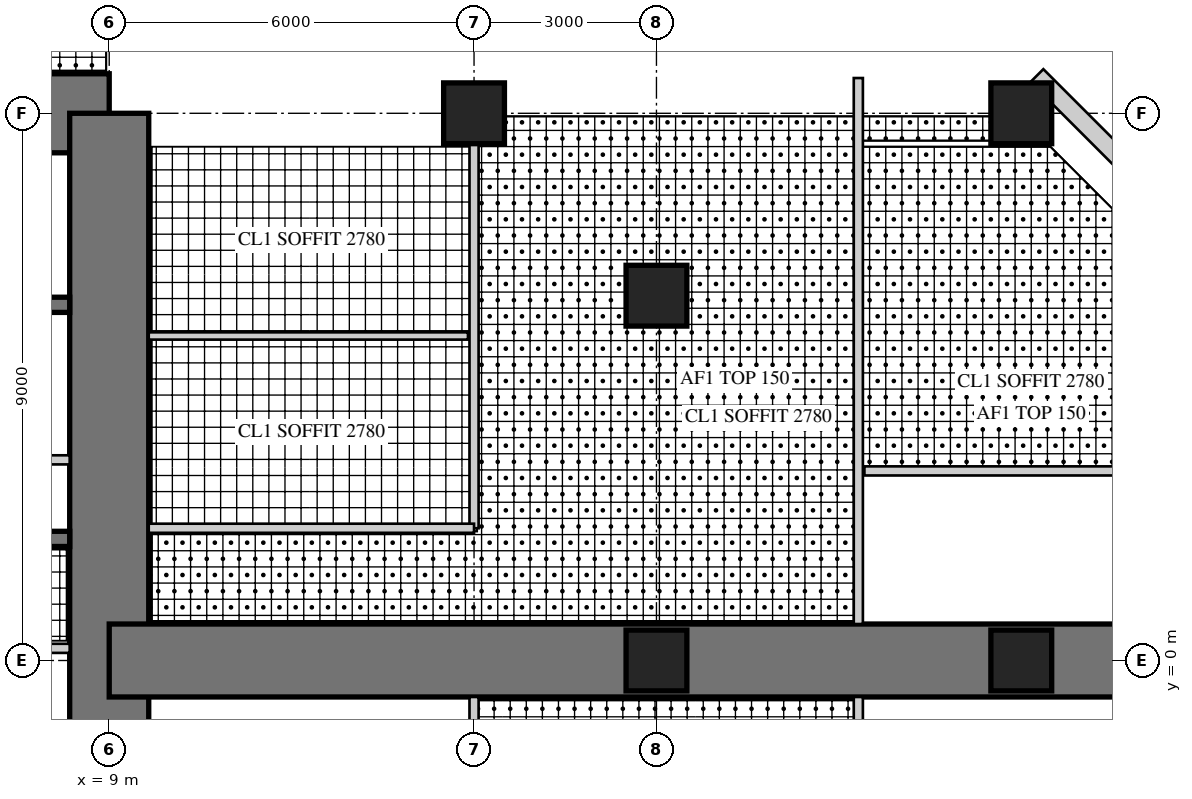
"""IFC4 building model, lengths in metres.
Left out: names, types, materials, properties, quantities, classifications, styles, units other than length and angle.
Written with IfcOpenShell. Run it as: python <this file> out.ifc"""

import sys

from ifc_helpers import new_model, si_unit, direction, frame, frame_2d, origin, origin_2d, place, context, subcontext, project, spatial, rectangle, extrude, element, fill, save


model = new_model("IFC4")
c1 = context("Model", 3, precision=1e-05, world=origin(), true_north=direction((0.0, 1.0)))
c2 = subcontext(c1, "Body", "Model", "MODEL_VIEW")
j1 = project(units=[si_unit("LENGTHUNIT", "METRE"), si_unit("PLANEANGLEUNIT", "RADIAN")], contexts=[c1])
p1 = place(None, origin())
s1 = spatial("IfcSite", under=j1, at=p1, CompositionType="ELEMENT")
p2 = place(p1, origin())
s2 = spatial("IfcBuilding", under=s1, at=p2, CompositionType="ELEMENT")
p3 = place(p2, frame((0.0, 0.0, 124.5)))
s3 = spatial("IfcBuildingStorey", under=s2, at=p3, CompositionType="ELEMENT", Elevation=124.5)
p4 = place(p3, frame((9.0, 9.0, 0.0), z_axis=(0.0, 0.0, 1.0), x_axis=(-1.0, 0.0, 0.0)))
e1 = element("IfcWall", 1, at=p4, inside=s3, PredefinedType="SHEAR", context=c2, shape_type="SweptSolid", body=[
    extrude(rectangle(XDim=18.0, YDim=1.3, at=frame_2d((9.0, 0.0))), origin(), (0.0, 0.0, 1.0), 4.0),
])
p5 = place(p4, frame((9.8, 0.0, 0.0)))
e2 = element("IfcOpeningElement", 2, at=p5, cuts=e1, PredefinedType="OPENING", context=c2, shape_type="SweptSolid", body=[
    extrude(rectangle(XDim=1.0, YDim=2.4, at=frame_2d((0.5, 1.2))), frame((0.0, 0.66, 0.0), z_axis=(0.0, -1.0, 0.0), x_axis=(1.0, 0.0, 0.0)), (0.0, 0.0, 1.0), 1.32),
])
p6 = place(p3, frame((9.0, -9.0, 0.0), z_axis=(0.0, 0.0, 1.0), x_axis=(0.0, 1.0, 0.0)))
e3 = element("IfcWall", 3, at=p6, inside=s3, PredefinedType="SHEAR", context=c2, shape_type="SweptSolid", body=[
    extrude(rectangle(XDim=18.0, YDim=1.3, at=frame_2d((9.0, 0.0))), origin(), (0.0, 0.0, 1.0), 4.0),
])
p7 = place(p6, frame((9.8, 0.0, 0.0)))
e4 = element("IfcOpeningElement", 4, at=p7, cuts=e3, PredefinedType="OPENING", context=c2, shape_type="SweptSolid", body=[
    extrude(rectangle(XDim=1.0, YDim=2.4, at=frame_2d((0.5, 1.2))), frame((0.0, 0.66, 0.0), z_axis=(0.0, -1.0, 0.0), x_axis=(1.0, 0.0, 0.0)), (0.0, 0.0, 1.0), 1.32),
])
p8 = place(p3, frame((1.925, 2.0, 0.0), z_axis=(0.0, 0.0, 1.0), x_axis=(1.0, 0.0, 0.0)))
e5 = element("IfcWall", 5, at=p8, inside=s3, PredefinedType="SHEAR", context=c2, shape_type="SweptSolid", body=[
    extrude(rectangle(XDim=6.425, YDim=0.25, at=frame_2d((3.212, 0.0))), origin(), (0.0, 0.0, 1.0), 4.0),
])
p9 = place(p3, frame((1.925, 5.85, 0.0), z_axis=(0.0, 0.0, 1.0), x_axis=(1.0, 0.0, 0.0)))
e6 = element("IfcWall", 6, at=p9, inside=s3, PredefinedType="SHEAR", context=c2, shape_type="SweptSolid", body=[
    extrude(rectangle(XDim=6.425, YDim=0.25, at=frame_2d((3.212, 0.0))), origin(), (0.0, 0.0, 1.0), 4.0),
])
p10 = place(p9, frame((0.454, 0.0, 0.0)))
e7 = element("IfcOpeningElement", 7, at=p10, cuts=e6, PredefinedType="OPENING", context=c2, shape_type="SweptSolid", body=[
    extrude(rectangle(XDim=1.1, YDim=2.2, at=frame_2d((0.55, 1.1))), frame((0.0, 0.135, 0.0), z_axis=(0.0, -1.0, 0.0), x_axis=(1.0, 0.0, 0.0)), (0.0, 0.0, 1.0), 0.27),
])
p11 = place(p9, frame((2.663, 0.0, 0.0)))
e8 = element("IfcOpeningElement", 8, at=p11, cuts=e6, PredefinedType="OPENING", context=c2, shape_type="SweptSolid", body=[
    extrude(rectangle(XDim=1.1, YDim=2.2, at=frame_2d((0.55, 1.1))), frame((0.0, 0.135, 0.0), z_axis=(0.0, -1.0, 0.0), x_axis=(1.0, 0.0, 0.0)), (0.0, 0.0, 1.0), 0.27),
])
p12 = place(p9, frame((4.871, 0.0, 0.0)))
e9 = element("IfcOpeningElement", 9, at=p12, cuts=e6, PredefinedType="OPENING", context=c2, shape_type="SweptSolid", body=[
    extrude(rectangle(XDim=1.1, YDim=2.2, at=frame_2d((0.55, 1.1))), frame((0.0, 0.135, 0.0), z_axis=(0.0, -1.0, 0.0), x_axis=(1.0, 0.0, 0.0)), (0.0, 0.0, 1.0), 0.27),
])
p13 = place(p3, frame((1.925, 3.3, 0.0), z_axis=(0.0, 0.0, 1.0), x_axis=(1.0, 0.0, 0.0)))
e10 = element("IfcWall", 10, at=p13, inside=s3, PredefinedType="PARTITIONING", context=c2, shape_type="SweptSolid", body=[
    extrude(rectangle(XDim=6.425, YDim=0.15, at=frame_2d((3.212, 0.0))), origin(), (0.0, 0.0, 1.0), 4.0),
])
p14 = place(p13, frame((0.075, 0.0, 0.0)))
e11 = element("IfcOpeningElement", 11, at=p14, cuts=e10, PredefinedType="OPENING", context=c2, shape_type="SweptSolid", body=[
    extrude(rectangle(XDim=0.8, YDim=2.1, at=frame_2d((0.4, 1.05))), frame((0.0, 0.085, 0.0), z_axis=(0.0, -1.0, 0.0), x_axis=(1.0, 0.0, 0.0)), (0.0, 0.0, 1.0), 0.17),
])
p15 = place(p13, frame((3.675, 0.0, 0.0)))
e12 = element("IfcOpeningElement", 12, at=p15, cuts=e10, PredefinedType="OPENING", context=c2, shape_type="SweptSolid", body=[
    extrude(rectangle(XDim=0.8, YDim=2.1, at=frame_2d((0.4, 1.05))), frame((0.0, 0.085, 0.0), z_axis=(0.0, -1.0, 0.0), x_axis=(1.0, 0.0, 0.0)), (0.0, 0.0, 1.0), 0.17),
])
p16 = place(p3, frame((9.0, 0.0, 0.0), z_axis=(0.0, 0.0, 1.0), x_axis=(1.0, 0.0, 0.0)))
e13 = element("IfcWall", 13, at=p16, inside=s3, PredefinedType="SHEAR", context=c2, shape_type="SweptSolid", body=[
    extrude(rectangle(XDim=18.0, YDim=1.2, at=frame_2d((9.0, 0.0))), origin(), (0.0, 0.0, 1.0), 4.0),
])
p17 = place(p16, frame((9.8, 0.0, 0.0)))
e14 = element("IfcOpeningElement", 14, at=p17, cuts=e13, PredefinedType="OPENING", context=c2, shape_type="SweptSolid", body=[
    extrude(rectangle(XDim=1.0, YDim=2.2, at=frame_2d((0.5, 1.1))), frame((0.0, 0.61, 0.0), z_axis=(0.0, -1.0, 0.0), x_axis=(1.0, 0.0, 0.0)), (0.0, 0.0, 1.0), 1.22),
])
for number, where, z_axis, x_axis in (
    (15, (15.0, 9.0, 0.0), (0.0, 0.0, 1.0), (1.0, 0.0, 0.0)),
    (16, (24.0, 9.0, 0.0), (0.0, 0.0, 1.0), (1.0, 0.0, 0.0)),
    (17, (18.0, 0.0, 0.0), (0.0, 0.0, 1.0), (1.0, 0.0, 0.0)),
    (18, (18.0, 6.0, 0.0), (0.0, 0.0, 1.0), (1.0, 0.0, 0.0)),
    (19, (24.0, 0.0, 0.0), (0.0, 0.0, 1.0), (1.0, 0.0, 0.0)),
):
    element("IfcColumn", number, at=place(p3, frame(where, z_axis=z_axis, x_axis=x_axis)), inside=s3, PredefinedType="COLUMN", context=c2, shape_type="SweptSolid", body=[
        extrude(rectangle(XDim=1.0, YDim=1.0, at=origin_2d()), origin(), (0.0, 0.0, 1.0), 4.0),
    ])
p18 = place(p3, frame((27.6, 6.277, 0.0), z_axis=(0.0, 0.0, 1.0), x_axis=(-0.707106781187, 0.707106781187, 0.0)))
e20 = element("IfcWall", 20, at=p18, inside=s3, PredefinedType="SOLIDWALL", context=c2, shape_type="SweptSolid", body=[
    extrude(rectangle(XDim=4.728, YDim=0.3, at=frame_2d((2.364, 0.0))), origin(), (0.0, 0.0, 1.0), 3.8),
])
p19 = place(p18, frame((1.914, 0.0, 0.3)))
e21 = element("IfcOpeningElement", 21, at=p19, cuts=e20, PredefinedType="OPENING", context=c2, shape_type="SweptSolid", body=[
    extrude(rectangle(XDim=0.9, YDim=2.4, at=frame_2d((0.45, 1.2))), frame((0.0, 0.16, 0.0), z_axis=(0.0, -1.0, 0.0), x_axis=(1.0, 0.0, 0.0)), (0.0, 0.0, 1.0), 0.32),
])
p20 = place(p3, frame((2.325, 0.2, 0.0), z_axis=(0.0, 0.0, 1.0), x_axis=(1.0, 0.0, 0.0)))
e22 = element("IfcWall", 22, at=p20, inside=s3, PredefinedType="PARTITIONING", context=c2, shape_type="SweptSolid", body=[
    extrude(rectangle(XDim=6.025, YDim=0.15, at=frame_2d((3.013, 0.0))), origin(), (0.0, 0.0, 1.0), 3.8),
])
p21 = place(p20, frame((0.4, 0.0, 0.0)))
e23 = element("IfcOpeningElement", 23, at=p21, cuts=e22, PredefinedType="OPENING", context=c2, shape_type="SweptSolid", body=[
    extrude(rectangle(XDim=1.0, YDim=2.1, at=frame_2d((0.5, 1.05))), frame((0.0, 0.085, 0.0), z_axis=(0.0, -1.0, 0.0), x_axis=(1.0, 0.0, 0.0)), (0.0, 0.0, 1.0), 0.17),
])
p22 = place(p3, frame((15.0, 2.175, 0.0), z_axis=(0.0, 0.0, 1.0), x_axis=(0.0, 1.0, 0.0)))
e24 = element("IfcWall", 24, at=p22, inside=s3, PredefinedType="PARTITIONING", context=c2, shape_type="SweptSolid", body=[
    extrude(rectangle(XDim=6.325, YDim=0.15, at=frame_2d((3.163, 0.0))), origin(), (0.0, 0.0, 1.0), 3.0),
])
p23 = place(p22, frame((1.081, 0.0, 0.0)))
e25 = element("IfcOpeningElement", 25, at=p23, cuts=e24, PredefinedType="OPENING", context=c2, shape_type="SweptSolid", body=[
    extrude(rectangle(XDim=1.0, YDim=2.1, at=frame_2d((0.5, 1.05))), frame((0.0, 0.085, 0.0), z_axis=(0.0, -1.0, 0.0), x_axis=(1.0, 0.0, 0.0)), (0.0, 0.0, 1.0), 0.17),
])
p24 = place(p22, frame((4.244, 0.0, 0.0)))
e26 = element("IfcOpeningElement", 26, at=p24, cuts=e24, PredefinedType="OPENING", context=c2, shape_type="SweptSolid", body=[
    extrude(rectangle(XDim=1.0, YDim=2.1, at=frame_2d((0.5, 1.05))), frame((0.0, 0.085, 0.0), z_axis=(0.0, -1.0, 0.0), x_axis=(1.0, 0.0, 0.0)), (0.0, 0.0, 1.0), 0.17),
])
p25 = place(p3, frame((9.65, 2.175, 0.0), z_axis=(0.0, 0.0, 1.0), x_axis=(1.0, 0.0, 0.0)))
e27 = element("IfcWall", 27, at=p25, inside=s3, PredefinedType="PARTITIONING", context=c2, shape_type="SweptSolid", body=[
    extrude(rectangle(XDim=5.35, YDim=0.15, at=frame_2d((2.675, 0.0))), origin(), (0.0, 0.0, 1.0), 3.8),
])
p26 = place(p3, frame((9.65, 5.337, 0.0), z_axis=(0.0, 0.0, 1.0), x_axis=(1.0, 0.0, 0.0)))
e28 = element("IfcWall", 28, at=p26, inside=s3, PredefinedType="PLUMBINGWALL", context=c2, shape_type="SweptSolid", body=[
    extrude(rectangle(XDim=5.25, YDim=0.12, at=frame_2d((2.625, 0.0))), origin(), (0.0, 0.0, 1.0), 3.8),
])
p27 = place(p3, frame((15.0, -8.5, 0.0), z_axis=(0.0, 0.0, 1.0), x_axis=(0.0, 1.0, 0.0)))
e29 = element("IfcWall", 29, at=p27, inside=s3, PredefinedType="PARTITIONING", context=c2, shape_type="SweptSolid", body=[
    extrude(rectangle(XDim=7.9, YDim=0.15, at=frame_2d((3.95, 0.0))), origin(), (0.0, 0.0, 1.0), 3.0),
])
p28 = place(p27, frame((0.8, 0.0, 0.0)))
e30 = element("IfcOpeningElement", 30, at=p28, cuts=e29, PredefinedType="OPENING", context=c2, shape_type="SweptSolid", body=[
    extrude(rectangle(XDim=1.0, YDim=2.1, at=frame_2d((0.5, 1.05))), frame((0.0, 0.085, 0.0), z_axis=(0.0, -1.0, 0.0), x_axis=(1.0, 0.0, 0.0)), (0.0, 0.0, 1.0), 0.17),
])
p29 = place(p27, frame((3.4, 0.0, 0.0)))
e31 = element("IfcOpeningElement", 31, at=p29, cuts=e29, PredefinedType="OPENING", context=c2, shape_type="SweptSolid", body=[
    extrude(rectangle(XDim=1.0, YDim=2.1, at=frame_2d((0.5, 1.05))), frame((0.0, 0.085, 0.0), z_axis=(0.0, -1.0, 0.0), x_axis=(1.0, 0.0, 0.0)), (0.0, 0.0, 1.0), 0.17),
])
p30 = place(p27, frame((6.05, 0.0, 0.0)))
e32 = element("IfcOpeningElement", 32, at=p30, cuts=e29, PredefinedType="OPENING", context=c2, shape_type="SweptSolid", body=[
    extrude(rectangle(XDim=1.0, YDim=2.1, at=frame_2d((0.5, 1.05))), frame((0.0, 0.085, 0.0), z_axis=(0.0, -1.0, 0.0), x_axis=(1.0, 0.0, 0.0)), (0.0, 0.0, 1.0), 0.17),
])
p31 = place(p3, frame((21.42, 3.118, 0.0), z_axis=(0.0, 0.0, 1.0), x_axis=(1.0, 0.0, 0.0)))
e33 = element("IfcWall", 33, at=p31, inside=s3, PredefinedType="PARTITIONING", context=c2, shape_type="SweptSolid", body=[
    extrude(rectangle(XDim=5.08, YDim=0.15, at=frame_2d((2.54, 0.0))), origin(), (0.0, 0.0, 1.0), 3.8),
])
p32 = place(p3, frame((21.32, 0.6, 0.0), z_axis=(0.0, 0.0, 1.0), x_axis=(0.0, 1.0, 0.0)))
e34 = element("IfcWall", 34, at=p32, inside=s3, PredefinedType="PARTITIONING", context=c2, shape_type="SweptSolid", body=[
    extrude(rectangle(XDim=8.98, YDim=0.15, at=frame_2d((4.49, 0.0))), origin(), (0.0, 0.0, 1.0), 3.8),
])
p33 = place(p32, frame((0.35, 0.0, 0.0)))
e35 = element("IfcOpeningElement", 35, at=p33, cuts=e34, PredefinedType="OPENING", context=c2, shape_type="SweptSolid", body=[
    extrude(rectangle(XDim=1.0, YDim=2.2, at=frame_2d((0.5, 1.1))), frame((0.0, 0.085, 0.0), z_axis=(0.0, -1.0, 0.0), x_axis=(1.0, 0.0, 0.0)), (0.0, 0.0, 1.0), 0.17),
])
p34 = place(p32, frame((2.993, 0.0, 0.0)))
e36 = element("IfcOpeningElement", 36, at=p34, cuts=e34, PredefinedType="OPENING", context=c2, shape_type="SweptSolid", body=[
    extrude(rectangle(XDim=1.0, YDim=2.2, at=frame_2d((0.5, 1.1))), frame((0.0, 0.085, 0.0), z_axis=(0.0, -1.0, 0.0), x_axis=(1.0, 0.0, 0.0)), (0.0, 0.0, 1.0), 0.17),
])
p35 = place(p3, frame((21.32, -9.58, 0.0), z_axis=(0.0, 0.0, 1.0), x_axis=(0.0, 1.0, 0.0)))
e37 = element("IfcWall", 37, at=p35, inside=s3, PredefinedType="PARTITIONING", context=c2, shape_type="SweptSolid", body=[
    extrude(rectangle(XDim=8.98, YDim=0.15, at=frame_2d((4.49, 0.0))), origin(), (0.0, 0.0, 1.0), 3.8),
])
p36 = place(p35, frame((4.987, 0.0, 0.0)))
e38 = element("IfcOpeningElement", 38, at=p36, cuts=e37, PredefinedType="OPENING", context=c2, shape_type="SweptSolid", body=[
    extrude(rectangle(XDim=1.0, YDim=2.2, at=frame_2d((0.5, 1.1))), frame((0.0, 0.085, 0.0), z_axis=(0.0, -1.0, 0.0), x_axis=(1.0, 0.0, 0.0)), (0.0, 0.0, 1.0), 0.17),
])
p37 = place(p35, frame((7.63, 0.0, 0.0)))
e39 = element("IfcOpeningElement", 39, at=p37, cuts=e37, PredefinedType="OPENING", context=c2, shape_type="SweptSolid", body=[
    extrude(rectangle(XDim=1.0, YDim=2.2, at=frame_2d((0.5, 1.1))), frame((0.0, 0.085, 0.0), z_axis=(0.0, -1.0, 0.0), x_axis=(1.0, 0.0, 0.0)), (0.0, 0.0, 1.0), 0.17),
])
p38 = place(p23, origin())
e40 = element("IfcDoor", 40, at=p38, inside=s3, OperationType="SINGLE_SWING_LEFT", PredefinedType="DOOR", context=c2, shape_type="SweptSolid", body=[
    extrude(rectangle(XDim=1.0, YDim=2.1, at=frame_2d((0.5, 1.05))), frame((0.0, 0.025, 0.0), z_axis=(0.0, -1.0, 0.0), x_axis=(1.0, 0.0, 0.0)), (0.0, 0.0, 1.0), 0.05),
])
fill(e25, e40)
p39 = place(p24, origin())
e41 = element("IfcDoor", 41, at=p39, inside=s3, OperationType="SINGLE_SWING_LEFT", PredefinedType="DOOR", context=c2, shape_type="SweptSolid", body=[
    extrude(rectangle(XDim=1.0, YDim=2.1, at=frame_2d((0.5, 1.05))), frame((0.0, 0.025, 0.0), z_axis=(0.0, -1.0, 0.0), x_axis=(1.0, 0.0, 0.0)), (0.0, 0.0, 1.0), 0.05),
])
fill(e26, e41)
p40 = place(p33, frame((1.0, 0.0, 0.0), z_axis=(0.0, 0.0, 1.0), x_axis=(-1.0, 0.0, 0.0)))
e42 = element("IfcDoor", 42, at=p40, inside=s3, OperationType="SINGLE_SWING_RIGHT", PredefinedType="DOOR", context=c2, shape_type="SweptSolid", body=[
    extrude(rectangle(XDim=1.0, YDim=2.2, at=frame_2d((0.5, 1.1))), frame((0.0, 0.025, 0.0), z_axis=(0.0, -1.0, 0.0), x_axis=(1.0, 0.0, 0.0)), (0.0, 0.0, 1.0), 0.05),
])
fill(e35, e42)
p41 = place(p34, frame((1.0, 0.0, 0.0), z_axis=(0.0, 0.0, 1.0), x_axis=(-1.0, 0.0, 0.0)))
e43 = element("IfcDoor", 43, at=p41, inside=s3, OperationType="SINGLE_SWING_RIGHT", PredefinedType="DOOR", context=c2, shape_type="SweptSolid", body=[
    extrude(rectangle(XDim=1.0, YDim=2.2, at=frame_2d((0.5, 1.1))), frame((0.0, 0.025, 0.0), z_axis=(0.0, -1.0, 0.0), x_axis=(1.0, 0.0, 0.0)), (0.0, 0.0, 1.0), 0.05),
])
fill(e36, e43)
p42 = place(p37, frame((1.0, 0.0, 0.0), z_axis=(0.0, 0.0, 1.0), x_axis=(-1.0, 0.0, 0.0)))
e44 = element("IfcDoor", 44, at=p42, inside=s3, OperationType="SINGLE_SWING_LEFT", PredefinedType="DOOR", context=c2, shape_type="SweptSolid", body=[
    extrude(rectangle(XDim=1.0, YDim=2.2, at=frame_2d((0.5, 1.1))), frame((0.0, 0.025, 0.0), z_axis=(0.0, -1.0, 0.0), x_axis=(1.0, 0.0, 0.0)), (0.0, 0.0, 1.0), 0.05),
])
fill(e39, e44)
p43 = place(p17, frame((1.0, 0.0, 0.0), z_axis=(0.0, 0.0, 1.0), x_axis=(-1.0, 0.0, 0.0)))
e45 = element("IfcDoor", 45, at=p43, inside=s3, OperationType="SINGLE_SWING_LEFT", PredefinedType="DOOR", context=c2, shape_type="SweptSolid", body=[
    extrude(rectangle(XDim=1.0, YDim=2.2, at=frame_2d((0.5, 1.1))), frame((0.0, 0.025, 0.0), z_axis=(0.0, -1.0, 0.0), x_axis=(1.0, 0.0, 0.0)), (0.0, 0.0, 1.0), 0.05),
])
fill(e14, e45)
p44 = place(p7, frame((1.0, 0.0, 0.0), z_axis=(0.0, 0.0, 1.0), x_axis=(-1.0, 0.0, 0.0)))
e46 = element("IfcDoor", 46, at=p44, inside=s3, OperationType="SINGLE_SWING_RIGHT", PredefinedType="DOOR", context=c2, shape_type="SweptSolid", body=[
    extrude(rectangle(XDim=1.0, YDim=2.4, at=frame_2d((0.5, 1.2))), frame((0.0, -0.005, 0.0), z_axis=(0.0, -1.0, 0.0), x_axis=(1.0, 0.0, 0.0)), (0.0, 0.0, 1.0), 0.05),
])
fill(e4, e46)
save(model, sys.argv[1])
